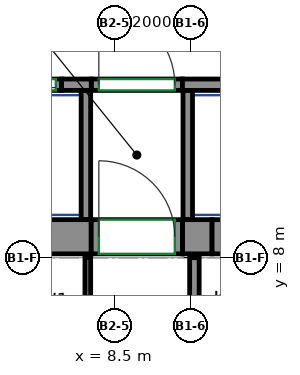
"""IFC4 building model, lengths in metres.
Left out: names, types, materials, properties, quantities, classifications, styles, units other than length and angle.
Written with IfcOpenShell. Run it as: python <this file> out.ifc"""

import sys

from ifc_helpers import new_model, si_unit, direction, frame, frame_2d, origin, place, context, subcontext, project, spatial, rectangle, extrude, source, transform, mapped, element, fill, save


model = new_model("IFC4")
c1 = context("Model", 3, precision=1e-05, world=origin(), true_north=direction((0.0, 1.0)))
c2 = subcontext(c1, "Body", "Model", "MODEL_VIEW")
j1 = project(units=[si_unit("LENGTHUNIT", "METRE"), si_unit("PLANEANGLEUNIT", "RADIAN")], contexts=[c1])
p1 = place(None, origin())
s1 = spatial("IfcSite", under=j1, at=p1, CompositionType="ELEMENT")
p2 = place(p1, origin())
s2 = spatial("IfcBuilding", under=s1, at=p2, CompositionType="ELEMENT")
p3 = place(p2, frame((0.0, 0.0, 168.5)))
s3 = spatial("IfcBuildingStorey", under=s2, at=p3, CompositionType="ELEMENT", Elevation=168.5)
m1 = source(origin(), c2, "Body", "SweptSolid", [
    extrude(rectangle(XDim=14.18, YDim=0.9, at=frame_2d((7.09, 0.0))), origin(), (0.0, 0.0, 1.0), 3.12),
])
p4 = place(p3, frame((-6.29, 8.55, 0.0), z_axis=(0.0, 0.0, 1.0), x_axis=(1.0, 0.0, 0.0)))
e1 = element("IfcWall", 1, at=p4, inside=s3, PredefinedType="SHEAR", context=c2, shape_type="MappedRepresentation", body=[
    mapped(m1, transform((0.0, 0.0, 0.0))),
])
m2 = source(origin(), c2, "Body", "SweptSolid", [
    extrude(rectangle(XDim=0.78, YDim=0.9, at=frame_2d((0.39, 0.0))), origin(), (0.0, 0.0, 1.0), 3.12),
])
p5 = place(p3, frame((10.29, 8.55, 0.0), z_axis=(0.0, 0.0, 1.0), x_axis=(1.0, 0.0, 0.0)))
e2 = element("IfcWall", 2, at=p5, inside=s3, PredefinedType="SHEAR", context=c2, shape_type="MappedRepresentation", body=[
    mapped(m2, transform((0.0, 0.0, 0.0))),
])
m3 = source(origin(), c2, "Body", "SweptSolid", [
    extrude(rectangle(XDim=0.78, YDim=0.3, at=frame_2d((0.39, 0.0))), origin(), (0.0, 0.0, 1.0), 3.12),
])
p6 = place(p3, frame((7.11, 12.55, 0.0), z_axis=(0.0, 0.0, 1.0), x_axis=(1.0, 0.0, 0.0)))
e3 = element("IfcWall", 3, at=p6, inside=s3, PredefinedType="SHEAR", context=c2, shape_type="MappedRepresentation", body=[
    mapped(m3, transform((0.0, 0.0, 0.0))),
])
m4 = source(origin(), c2, "Body", "SweptSolid", [
    extrude(rectangle(XDim=2.82, YDim=0.3, at=frame_2d((1.41, 0.0))), origin(), (0.0, 0.0, 1.0), 3.12),
])
p7 = place(p3, frame((10.29, 12.55, 0.0), z_axis=(0.0, 0.0, 1.0), x_axis=(1.0, 0.0, 0.0)))
e4 = element("IfcWall", 4, at=p7, inside=s3, PredefinedType="SHEAR", context=c2, shape_type="MappedRepresentation", body=[
    mapped(m4, transform((0.0, 0.0, 0.0))),
])
m5 = source(origin(), c2, "Body", "SweptSolid", [
    extrude(rectangle(XDim=1.4, YDim=0.3, at=frame_2d((0.7, 0.0))), origin(), (0.0, 0.0, 1.0), 3.12),
])
p8 = place(p3, frame((5.71, 12.55, 0.0), z_axis=(0.0, 0.0, 1.0), x_axis=(1.0, 0.0, 0.0)))
e5 = element("IfcWall", 5, at=p8, inside=s3, PredefinedType="PARTITIONING", context=c2, shape_type="MappedRepresentation", body=[
    mapped(m5, transform((0.0, 0.0, 0.0))),
])
p9 = place(p8, frame((0.15, 0.0, 0.0)))
e6 = element("IfcOpeningElement", 6, at=p9, cuts=e5, PredefinedType="OPENING", context=c2, shape_type="SweptSolid", body=[
    extrude(rectangle(XDim=1.1, YDim=2.1, at=frame_2d((0.55, 1.05))), frame((0.0, 0.16, 0.0), z_axis=(0.0, -1.0, 0.0), x_axis=(1.0, 0.0, 0.0)), (0.0, 0.0, 1.0), 0.32),
])
m6 = source(origin(), c2, "Body", "SweptSolid", [
    extrude(rectangle(XDim=2.4, YDim=0.3, at=frame_2d((1.2, 0.0))), origin(), (0.0, 0.0, 1.0), 3.12),
])
p10 = place(p3, frame((7.89, 12.55, 0.0), z_axis=(0.0, 0.0, 1.0), x_axis=(1.0, 0.0, 0.0)))
e7 = element("IfcWall", 7, at=p10, inside=s3, PredefinedType="PARTITIONING", context=c2, shape_type="MappedRepresentation", body=[
    mapped(m6, transform((0.0, 0.0, 0.0))),
])
p11 = place(p10, frame((0.2, 0.0, 0.0)))
e8 = element("IfcOpeningElement", 8, at=p11, cuts=e7, PredefinedType="OPENING", context=c2, shape_type="SweptSolid", body=[
    extrude(rectangle(XDim=2.0, YDim=2.1, at=frame_2d((1.0, 1.05))), frame((0.0, 0.16, 0.0), z_axis=(0.0, -1.0, 0.0), x_axis=(1.0, 0.0, 0.0)), (0.0, 0.0, 1.0), 0.32),
])
m7 = source(origin(), c2, "Body", "SweptSolid", [
    extrude(rectangle(XDim=2.65, YDim=0.25, at=frame_2d((1.325, 0.0))), origin(), (0.0, 0.0, 1.0), 3.12),
])
p12 = place(p3, frame((10.605, 5.35, 0.0), z_axis=(0.0, 0.0, 1.0), x_axis=(0.0, 1.0, 0.0)))
e9 = element("IfcWall", 9, at=p12, inside=s3, PredefinedType="PARTITIONING", context=c2, shape_type="MappedRepresentation", body=[
    mapped(m7, transform((0.0, 0.0, 0.0))),
])
m8 = source(origin(), c2, "Body", "SweptSolid", [
    extrude(rectangle(XDim=3.4, YDim=0.25, at=frame_2d((1.7, 0.0))), origin(), (0.0, 0.0, 1.0), 3.12),
])
for number, where, z_axis, x_axis in (
    (10, (10.43, 9.0, 0.0), (0.0, 0.0, 1.0), (0.0, 1.0, 0.0)),
    (11, (7.75, 9.0, 0.0), (0.0, 0.0, 1.0), (0.0, 1.0, 0.0)),
):
    element("IfcWall", number, at=place(p3, frame(where, z_axis=z_axis, x_axis=x_axis)), inside=s3, PredefinedType="PARTITIONING", context=c2, shape_type="MappedRepresentation", body=[
        mapped(m8, transform((0.0, 0.0, 0.0))),
    ])
m9 = source(origin(), c2, "Body", "SweptSolid", [
    extrude(rectangle(XDim=2.4, YDim=0.9, at=frame_2d((1.2, 0.0))), origin(), (0.0, 0.0, 1.0), 2.7),
])
p13 = place(p3, frame((7.89, 8.55, 0.0), z_axis=(0.0, 0.0, 1.0), x_axis=(1.0, 0.0, 0.0)))
e12 = element("IfcWall", 12, at=p13, inside=s3, PredefinedType="PARTITIONING", context=c2, shape_type="MappedRepresentation", body=[
    mapped(m9, transform((0.0, 0.0, 0.0))),
])
p14 = place(p13, frame((0.2, 0.0, 0.0)))
e13 = element("IfcOpeningElement", 13, at=p14, cuts=e12, PredefinedType="OPENING", context=c2, shape_type="SweptSolid", body=[
    extrude(rectangle(XDim=2.0, YDim=2.1, at=frame_2d((1.0, 1.05))), frame((0.0, 0.46, 0.0), z_axis=(0.0, -1.0, 0.0), x_axis=(1.0, 0.0, 0.0)), (0.0, 0.0, 1.0), 0.92),
])
m10 = source(origin(), c2, "Body", "SweptSolid", [
    extrude(rectangle(XDim=1.4, YDim=0.9, at=frame_2d((0.7, 0.0))), origin(), (0.0, 0.0, 1.0), 2.7),
])
p15 = place(p3, frame((11.07, 8.55, 0.0), z_axis=(0.0, 0.0, 1.0), x_axis=(1.0, 0.0, 0.0)))
e14 = element("IfcWall", 14, at=p15, inside=s3, PredefinedType="PARTITIONING", context=c2, shape_type="MappedRepresentation", body=[
    mapped(m10, transform((0.0, 0.0, 0.0))),
])
p16 = place(p15, frame((0.25, 0.0, 0.0)))
e15 = element("IfcOpeningElement", 15, at=p16, cuts=e14, PredefinedType="OPENING", context=c2, shape_type="SweptSolid", body=[
    extrude(rectangle(XDim=0.9, YDim=2.1, at=frame_2d((0.45, 1.05))), frame((0.0, 0.46, 0.0), z_axis=(0.0, -1.0, 0.0), x_axis=(1.0, 0.0, 0.0)), (0.0, 0.0, 1.0), 0.92),
])
p17 = place(p3, frame((7.8, 8.0, 0.0), z_axis=(0.0, 0.0, 1.0), x_axis=(0.0, -1.0, 0.0)))
e16 = element("IfcWall", 16, at=p17, inside=s3, PredefinedType="PARTITIONING", context=c2, shape_type="SweptSolid", body=[
    extrude(rectangle(XDim=2.325, YDim=0.15, at=frame_2d((1.163, 0.0))), origin(), (0.0, 0.0, 1.0), 3.12),
])
p18 = place(p11, origin())
e17 = element("IfcDoor", 17, at=p18, inside=s3, OperationType="DOUBLE_DOOR_SINGLE_SWING", PredefinedType="DOOR", context=c2, shape_type="SweptSolid", body=[
    extrude(rectangle(XDim=2.0, YDim=2.1, at=frame_2d((1.0, 1.05))), frame((0.0, 0.025, 0.0), z_axis=(0.0, -1.0, 0.0), x_axis=(1.0, 0.0, 0.0)), (0.0, 0.0, 1.0), 0.05),
])
fill(e8, e17)
p19 = place(p14, origin())
e18 = element("IfcDoor", 18, at=p19, inside=s3, OperationType="DOUBLE_DOOR_SINGLE_SWING", PredefinedType="DOOR", context=c2, shape_type="SweptSolid", body=[
    extrude(rectangle(XDim=2.0, YDim=2.1, at=frame_2d((1.0, 1.05))), frame((0.0, 0.355, 0.0), z_axis=(0.0, -1.0, 0.0), x_axis=(1.0, 0.0, 0.0)), (0.0, 0.0, 1.0), 0.05),
])
fill(e13, e18)
p20 = place(p9, origin())
e19 = element("IfcDoor", 19, at=p20, inside=s3, OperationType="DOUBLE_DOOR_SLIDING", PredefinedType="DOOR", context=c2, shape_type="SweptSolid", body=[
    extrude(rectangle(XDim=1.1, YDim=2.1, at=frame_2d((0.55, 1.05))), frame((0.0, 0.025, 0.0), z_axis=(0.0, -1.0, 0.0), x_axis=(1.0, 0.0, 0.0)), (0.0, 0.0, 1.0), 0.05),
])
fill(e6, e19)
save(model, sys.argv[1])
